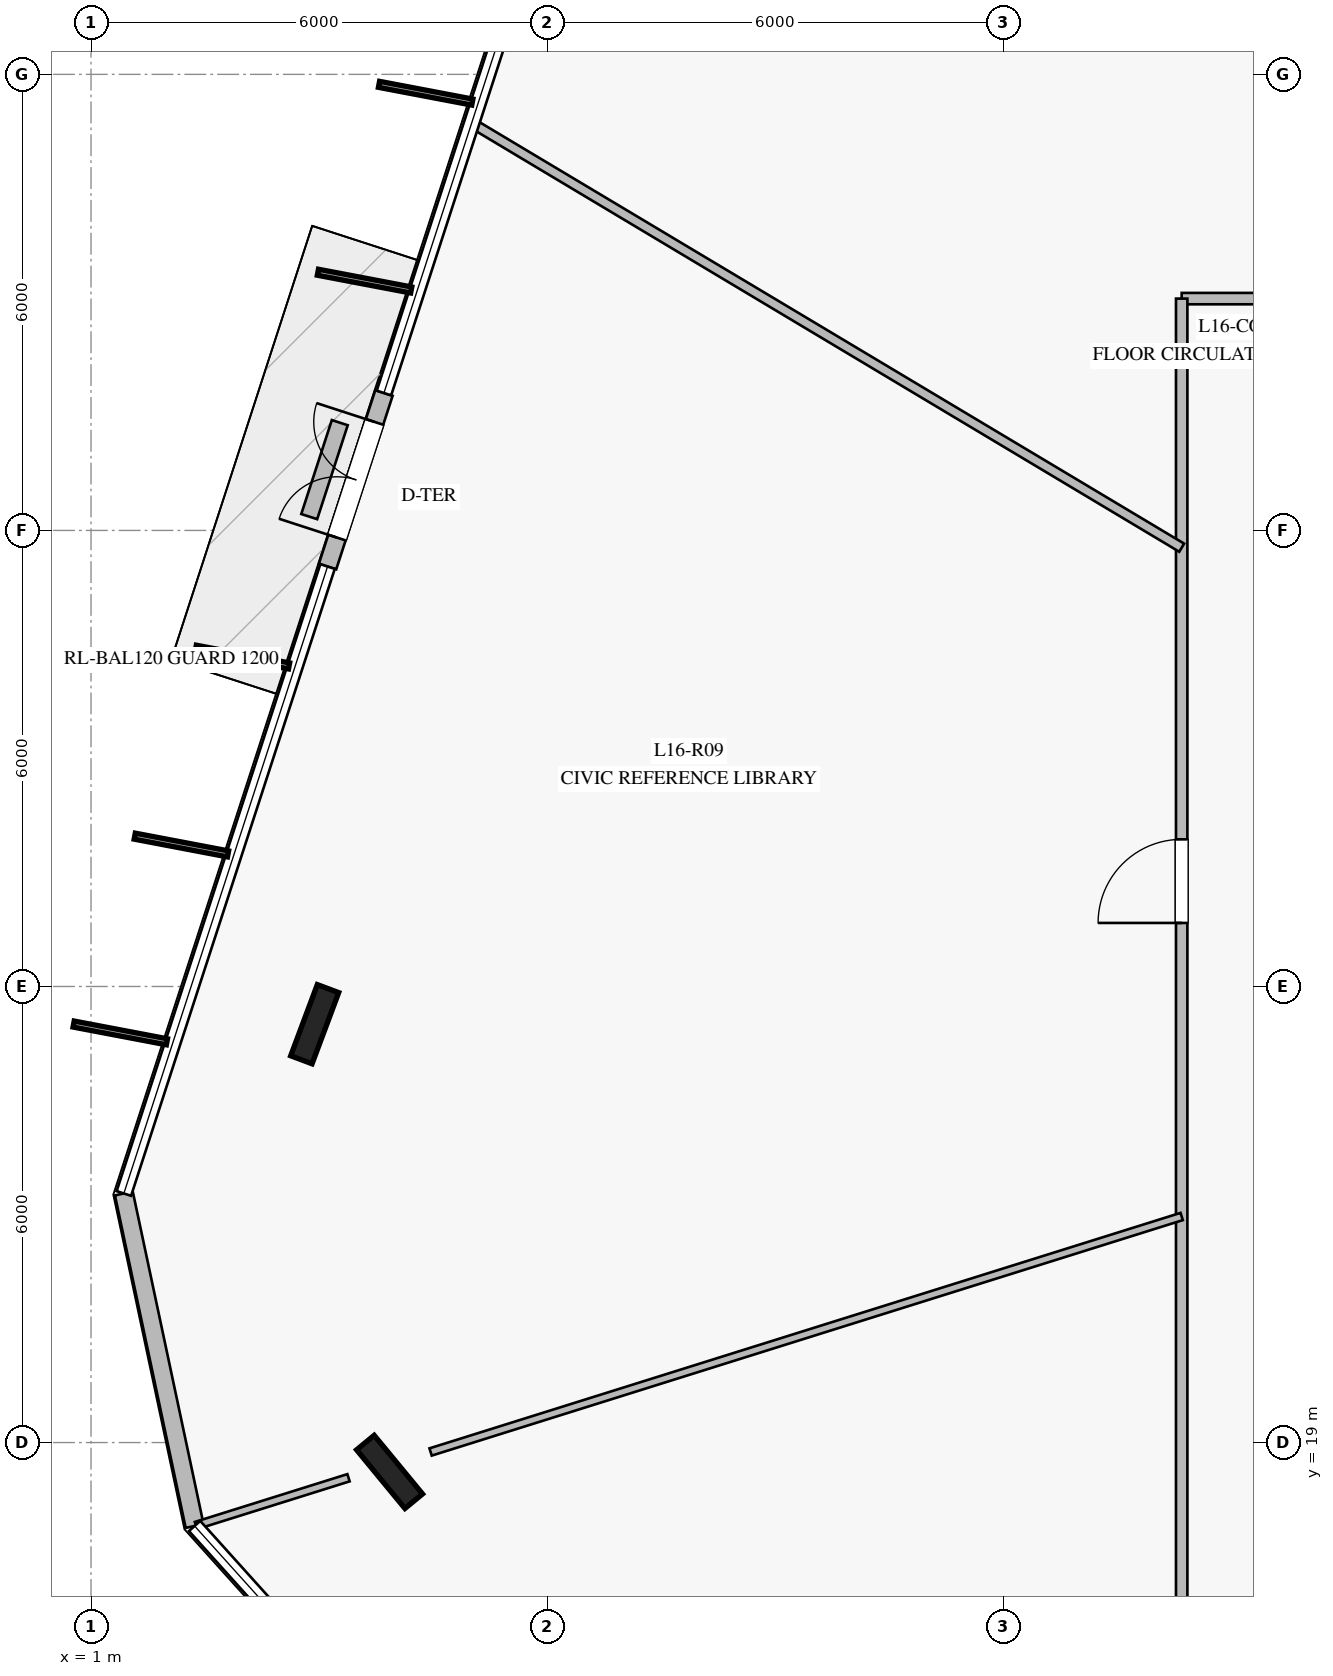
"""IFC4 building model, lengths in metres.
Left out: names, types, materials, properties, quantities, classifications, styles, units other than length and angle.
Written with IfcOpenShell. Run it as: python <this file> out.ifc"""

import sys

from ifc_helpers import new_model, si_unit, direction, frame, frame_2d, origin, origin_2d, place, context, subcontext, project, spatial, rectangle, i_section, extrude, element, fill, save


model = new_model("IFC4")
c1 = context("Model", 3, precision=1e-05, world=origin(), true_north=direction((0.0, 1.0)))
c2 = subcontext(c1, "Body", "Model", "MODEL_VIEW")
j1 = project(units=[si_unit("LENGTHUNIT", "METRE"), si_unit("PLANEANGLEUNIT", "RADIAN")], contexts=[c1])
p1 = place(None, origin())
s1 = spatial("IfcSite", under=j1, at=p1, CompositionType="ELEMENT")
p2 = place(p1, origin())
s2 = spatial("IfcBuilding", under=s1, at=p2, CompositionType="ELEMENT")
p3 = place(p2, frame((0.0, 0.0, 68.0)))
s3 = spatial("IfcBuildingStorey", under=s2, at=p3, CompositionType="ELEMENT", Elevation=68.0)
for number, where, z_axis, x_axis in (
    (1, (3.943, 24.504, 0.0), (0.0, 0.0, 1.0), (0.35, 0.937, 0.0)),
    (2, (4.928, 18.614, 0.0), (0.0, 0.0, 1.0), (-0.636, 0.772, 0.0)),
):
    element("IfcColumn", number, at=place(p3, frame(where, z_axis=z_axis, x_axis=x_axis)), inside=s3, PredefinedType="COLUMN", context=c2, shape_type="SweptSolid", body=[
        extrude(i_section(OverallWidth=0.3, OverallDepth=1.0, WebThickness=0.019, FlangeThickness=0.036, at=origin_2d()), origin(), (0.0, 0.0, 1.0), 4.0),
    ])
p4 = place(p3, frame((4.854, 32.808, 0.0), z_axis=(0.0, 0.0, 1.0), x_axis=(-0.309049280464, -0.951046025303, 0.0)))
e3 = element("IfcWall", 3, at=p4, inside=s3, PredefinedType="STANDARD", context=c2, shape_type="SweptSolid", body=[
    extrude(rectangle(XDim=2.401, YDim=0.24, at=frame_2d((1.2, 0.0))), origin(), (0.0, 0.0, 1.0), 3.76),
])
p5 = place(p4, frame((0.4, 0.0, 0.0)))
e4 = element("IfcOpeningElement", 4, at=p5, cuts=e3, PredefinedType="OPENING", context=c2, shape_type="SweptSolid", body=[
    extrude(rectangle(XDim=1.6, YDim=2.25, at=frame_2d((0.8, 1.125))), frame((0.0, 0.13, 0.0), z_axis=(0.0, -1.0, 0.0), x_axis=(1.0, 0.0, 0.0)), (0.0, 0.0, 1.0), 0.26),
])
p6 = place(p3, frame((1.432, 22.277, 0.0), z_axis=(0.0, 0.0, 1.0), x_axis=(0.20817208226, -0.978092216597, 0.0)))
e5 = element("IfcWall", 5, at=p6, inside=s3, PredefinedType="STANDARD", context=c2, shape_type="SweptSolid", body=[
    extrude(rectangle(XDim=4.473, YDim=0.24, at=frame_2d((2.236, 0.0))), origin(), (0.0, 0.0, 1.0), 3.76),
])
p7 = place(p3, frame((4.273, 32.418, 0.0), z_axis=(0.0, 0.0, 1.0), x_axis=(-0.309175263073, -0.951005077118, 0.0)))
e6 = element("IfcWall", 6, at=p7, inside=s3, PredefinedType="USERDEFINED", context=c2, shape_type="SweptSolid", body=[
    extrude(rectangle(XDim=1.3, YDim=0.22, at=frame_2d((0.65, 0.0))), origin(), (0.0, 0.0, 1.0), 0.4),
])
p8 = place(p3, frame((15.35, 34.05, 0.0), z_axis=(0.0, 0.0, 1.0), x_axis=(1.0, 0.0, 0.0)))
e7 = element("IfcWall", 7, at=p8, inside=s3, PredefinedType="PARTITIONING", context=c2, shape_type="SweptSolid", body=[
    extrude(rectangle(XDim=19.3, YDim=0.15, at=frame_2d((9.65, 0.0))), origin(), (0.0, 0.0, 1.0), 3.21),
])
p9 = place(p8, frame((16.87, 0.0, 0.0)))
e8 = element("IfcOpeningElement", 8, at=p9, cuts=e7, PredefinedType="OPENING", context=c2, shape_type="SweptSolid", body=[
    extrude(rectangle(XDim=1.1, YDim=2.2, at=frame_2d((0.55, 1.1))), frame((0.0, 0.085, 0.0), z_axis=(0.0, -1.0, 0.0), x_axis=(1.0, 0.0, 0.0)), (0.0, 0.0, 1.0), 0.17),
])
p10 = place(p8, frame((11.431, 0.0, 0.0)))
e9 = element("IfcOpeningElement", 9, at=p10, cuts=e7, PredefinedType="OPENING", context=c2, shape_type="SweptSolid", body=[
    extrude(rectangle(XDim=1.1, YDim=2.2, at=frame_2d((0.55, 1.1))), frame((0.0, 0.085, 0.0), z_axis=(0.0, -1.0, 0.0), x_axis=(1.0, 0.0, 0.0)), (0.0, 0.0, 1.0), 0.17),
])
p11 = place(p8, frame((3.579, 0.0, 0.0)))
e10 = element("IfcOpeningElement", 10, at=p11, cuts=e7, PredefinedType="OPENING", context=c2, shape_type="SweptSolid", body=[
    extrude(rectangle(XDim=1.1, YDim=2.2, at=frame_2d((0.55, 1.1))), frame((0.0, 0.085, 0.0), z_axis=(0.0, -1.0, 0.0), x_axis=(1.0, 0.0, 0.0)), (0.0, 0.0, 1.0), 0.17),
])
p12 = place(p3, frame((15.35, 15.95, 0.0), z_axis=(0.0, 0.0, 1.0), x_axis=(0.0, 1.0, 0.0)))
e11 = element("IfcWall", 11, at=p12, inside=s3, PredefinedType="PARTITIONING", context=c2, shape_type="SweptSolid", body=[
    extrude(rectangle(XDim=18.1, YDim=0.15, at=frame_2d((9.05, 0.0))), origin(), (0.0, 0.0, 1.0), 3.21),
])
p13 = place(p12, frame((9.886, 0.0, 0.0)))
e12 = element("IfcOpeningElement", 12, at=p13, cuts=e11, PredefinedType="OPENING", context=c2, shape_type="SweptSolid", body=[
    extrude(rectangle(XDim=1.1, YDim=2.2, at=frame_2d((0.55, 1.1))), frame((0.0, 0.085, 0.0), z_axis=(0.0, -1.0, 0.0), x_axis=(1.0, 0.0, 0.0)), (0.0, 0.0, 1.0), 0.17),
])
p14 = place(p3, frame((15.35, 30.773, 0.0), z_axis=(0.0, 0.0, 1.0), x_axis=(-0.858205730497, 0.513305877759, 0.0)))
e13 = element("IfcWall", 13, at=p14, inside=s3, PredefinedType="PARTITIONING", context=c2, shape_type="SweptSolid", body=[
    extrude(rectangle(XDim=10.867, YDim=0.125, at=frame_2d((5.434, 0.0))), origin(), (0.0, 0.0, 1.0), 3.06),
])
p15 = place(p3, frame((15.35, 21.974, 0.0), z_axis=(0.0, 0.0, 1.0), x_axis=(-0.954204822742, -0.299154067757, 0.0)))
e14 = element("IfcWall", 14, at=p15, inside=s3, PredefinedType="MOVABLE", context=c2, shape_type="SweptSolid", body=[
    extrude(rectangle(XDim=10.356, YDim=0.1, at=frame_2d((5.178, 0.0))), origin(), (0.0, 0.0, 1.0), 3.21),
])
p16 = place(p3, frame((4.388, 18.537, 0.0), z_axis=(0.0, 0.0, 1.0), x_axis=(-0.954206927471, -0.299147354269, 0.0)))
e15 = element("IfcWall", 15, at=p16, inside=s3, PredefinedType="MOVABLE", context=c2, shape_type="SweptSolid", body=[
    extrude(rectangle(XDim=2.103, YDim=0.1, at=frame_2d((1.052, 0.0))), origin(), (0.0, 0.0, 1.0), 3.76),
])
p17 = place(p5, frame((1.6, 0.0, 0.0), z_axis=(0.0, 0.0, 1.0), x_axis=(-1.0, 0.0, 0.0)))
e16 = element("IfcDoor", 16, at=p17, inside=s3, OperationType="DOUBLE_DOOR_SINGLE_SWING", PredefinedType="DOOR", context=c2, shape_type="SweptSolid", body=[
    extrude(rectangle(XDim=1.6, YDim=2.25, at=frame_2d((0.8, 1.125))), frame((0.0, 0.025, 0.0), z_axis=(0.0, -1.0, 0.0), x_axis=(1.0, 0.0, 0.0)), (0.0, 0.0, 1.0), 0.05),
])
fill(e4, e16)
p18 = place(p13, origin())
e17 = element("IfcDoor", 17, at=p18, inside=s3, OperationType="SINGLE_SWING_LEFT", PredefinedType="DOOR", context=c2, shape_type="SweptSolid", body=[
    extrude(rectangle(XDim=1.1, YDim=2.2, at=frame_2d((0.55, 1.1))), frame((0.0, 0.025, 0.0), z_axis=(0.0, -1.0, 0.0), x_axis=(1.0, 0.0, 0.0)), (0.0, 0.0, 1.0), 0.05),
])
fill(e12, e17)
save(model, sys.argv[1])
